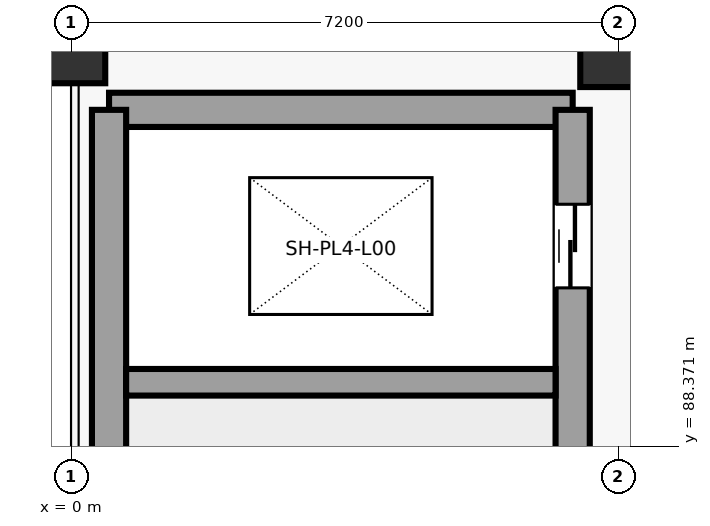
"""IFC4 building model, lengths in metres.
Left out: names, types, materials, properties, quantities, classifications, styles, units other than length and angle.
Written with IfcOpenShell. Run it as: python <this file> out.ifc"""

import sys

from ifc_helpers import new_model, si_unit, direction, frame, frame_2d, origin, origin_2d, place, context, subcontext, project, spatial, rectangle, extrude, element, fill, save


model = new_model("IFC4")
c1 = context("Model", 3, precision=1e-05, world=origin(), true_north=direction((0.0, 1.0)))
c2 = subcontext(c1, "Body", "Model", "MODEL_VIEW")
j1 = project(units=[si_unit("LENGTHUNIT", "METRE"), si_unit("PLANEANGLEUNIT", "RADIAN")], contexts=[c1])
p1 = place(None, origin())
s1 = spatial("IfcSite", under=j1, at=p1, CompositionType="ELEMENT")
p2 = place(p1, origin())
s2 = spatial("IfcBuilding", under=s1, at=p2, CompositionType="ELEMENT")
p3 = place(p2, origin())
s3 = spatial("IfcBuildingStorey", under=s2, at=p3, CompositionType="ELEMENT", Elevation=0.0)
p4 = place(p3, frame((0.0, 93.6, 0.0), z_axis=(0.0, 0.0, 1.0), x_axis=(1.0, 0.0, 0.0)))
e1 = element("IfcColumn", 1, at=p4, inside=s3, PredefinedType="COLUMN", context=c2, shape_type="SweptSolid", body=[
    extrude(rectangle(XDim=0.9, YDim=0.9, at=origin_2d()), origin(), (0.0, 0.0, 1.0), 5.4),
])
p5 = place(p3, frame((7.2, 93.6, 0.0), z_axis=(0.0, 0.0, 1.0), x_axis=(1.0, 0.0, 0.0)))
e2 = element("IfcColumn", 2, at=p5, inside=s3, PredefinedType="COLUMN", context=c2, shape_type="SweptSolid", body=[
    extrude(rectangle(XDim=1.0, YDim=1.0, at=origin_2d()), origin(), (0.0, 0.0, 1.0), 5.4),
])
p6 = place(p3, frame((0.5, 92.8, 0.0), z_axis=(0.0, 0.0, 1.0), x_axis=(1.0, 0.0, 0.0)))
e3 = element("IfcWall", 3, at=p6, inside=s3, PredefinedType="SHEAR", context=c2, shape_type="SweptSolid", body=[
    extrude(rectangle(XDim=6.1, YDim=0.45, at=frame_2d((3.05, 0.0))), origin(), (0.0, 0.0, 1.0), 5.06),
])
p7 = place(p3, frame((0.5, 80.0, 0.0), z_axis=(0.0, 0.0, 1.0), x_axis=(0.0, 1.0, 0.0)))
e4 = element("IfcWall", 4, at=p7, inside=s3, PredefinedType="SHEAR", context=c2, shape_type="SweptSolid", body=[
    extrude(rectangle(XDim=12.8, YDim=0.45, at=frame_2d((6.4, 0.0))), origin(), (0.0, 0.0, 1.0), 5.06),
])
p8 = place(p7, frame((0.55, 0.0, 0.0)))
e5 = element("IfcOpeningElement", 5, at=p8, cuts=e4, PredefinedType="OPENING", context=c2, shape_type="SweptSolid", body=[
    extrude(rectangle(XDim=1.5, YDim=2.25, at=frame_2d((0.75, 1.125))), frame((0.0, 0.235, 0.0), z_axis=(0.0, -1.0, 0.0), x_axis=(1.0, 0.0, 0.0)), (0.0, 0.0, 1.0), 0.47),
])
p9 = place(p3, frame((6.6, 80.0, 0.0), z_axis=(0.0, 0.0, 1.0), x_axis=(0.0, 1.0, 0.0)))
e6 = element("IfcWall", 6, at=p9, inside=s3, PredefinedType="SHEAR", context=c2, shape_type="SweptSolid", body=[
    extrude(rectangle(XDim=12.8, YDim=0.45, at=frame_2d((6.4, 0.0))), origin(), (0.0, 0.0, 1.0), 5.06),
])
p10 = place(p9, frame((0.55, 0.0, 0.0)))
e7 = element("IfcOpeningElement", 7, at=p10, cuts=e6, PredefinedType="OPENING", context=c2, shape_type="SweptSolid", body=[
    extrude(rectangle(XDim=1.2, YDim=2.25, at=frame_2d((0.6, 1.125))), frame((0.0, 0.235, 0.0), z_axis=(0.0, -1.0, 0.0), x_axis=(1.0, 0.0, 0.0)), (0.0, 0.0, 1.0), 0.47),
])
p11 = place(p9, frame((10.458, 0.0, 0.0)))
e8 = element("IfcOpeningElement", 8, at=p11, cuts=e6, PredefinedType="OPENING", context=c2, shape_type="SweptSolid", body=[
    extrude(rectangle(XDim=1.1, YDim=2.2, at=frame_2d((0.55, 1.1))), frame((0.0, 0.235, 0.0), z_axis=(0.0, -1.0, 0.0), x_axis=(1.0, 0.0, 0.0)), (0.0, 0.0, 1.0), 0.47),
])
p12 = place(p3, frame((0.725, 89.216, 0.0), z_axis=(0.0, 0.0, 1.0), x_axis=(1.0, 0.0, 0.0)))
e9 = element("IfcWall", 9, at=p12, inside=s3, PredefinedType="SHEAR", context=c2, shape_type="SweptSolid", body=[
    extrude(rectangle(XDim=5.65, YDim=0.35, at=frame_2d((2.825, 0.0))), origin(), (0.0, 0.0, 1.0), 5.06),
])
p13 = place(p11, origin())
e10 = element("IfcDoor", 10, at=p13, inside=s3, OperationType="SLIDING_TO_RIGHT", PredefinedType="DOOR", context=c2, shape_type="SweptSolid", body=[
    extrude(rectangle(XDim=1.1, YDim=2.2, at=frame_2d((0.55, 1.1))), frame((0.0, 0.025, 0.0), z_axis=(0.0, -1.0, 0.0), x_axis=(1.0, 0.0, 0.0)), (0.0, 0.0, 1.0), 0.05),
])
fill(e8, e10)
save(model, sys.argv[1])
